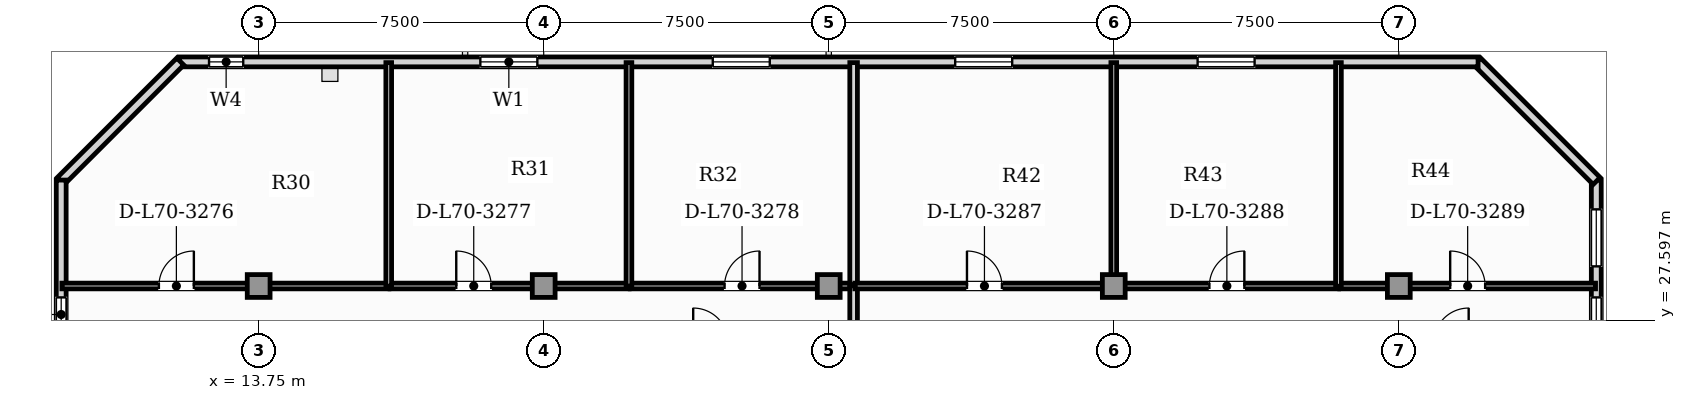
"""IFC4 building model, lengths in metres.
Left out: names, types, materials, properties, quantities, classifications, styles, units other than length and angle.
Written with IfcOpenShell. Run it as: python <this file> out.ifc"""

import sys

from ifc_helpers import new_model, si_unit, direction, frame, frame_2d, origin, origin_2d, place, context, subcontext, project, spatial, rectangle, extrude, element, fill, save


model = new_model("IFC4")
c1 = context("Model", 3, precision=1e-05, world=origin(), true_north=direction((0.0, 1.0)))
c2 = subcontext(c1, "Body", "Model", "MODEL_VIEW")
j1 = project(units=[si_unit("LENGTHUNIT", "METRE"), si_unit("PLANEANGLEUNIT", "RADIAN")], contexts=[c1])
p1 = place(None, origin())
s1 = spatial("IfcSite", under=j1, at=p1, CompositionType="ELEMENT")
p2 = place(p1, origin())
s2 = spatial("IfcBuilding", under=s1, at=p2, CompositionType="ELEMENT")
p3 = place(p2, frame((0.0, 0.0, 284.9)))
s3 = spatial("IfcBuildingStorey", under=s2, at=p3, CompositionType="ELEMENT", Elevation=284.9)
for number, where, z_axis, x_axis in (
    (1, (13.75, 28.5, 0.0), (0.0, 0.0, 1.0), (1.0, 0.0, 0.0)),
    (2, (21.25, 28.5, 0.0), (0.0, 0.0, 1.0), (1.0, 0.0, 0.0)),
    (3, (28.75, 28.5, 0.0), (0.0, 0.0, 1.0), (1.0, 0.0, 0.0)),
    (4, (36.25, 28.5, 0.0), (0.0, 0.0, 1.0), (1.0, 0.0, 0.0)),
    (5, (43.75, 28.5, 0.0), (0.0, 0.0, 1.0), (1.0, 0.0, 0.0)),
):
    element("IfcColumn", number, at=place(p3, frame(where, z_axis=z_axis, x_axis=x_axis)), inside=s3, PredefinedType="COLUMN", context=c2, shape_type="SweptSolid", body=[
        extrude(rectangle(XDim=0.6, YDim=0.6, at=origin_2d()), origin(), (0.0, 0.0, 1.0), 3.85),
    ])
p4 = place(p3, frame((48.946, 25.303, 0.0), z_axis=(0.0, 0.0, 1.0), x_axis=(0.0, 1.0, 0.0)))
e6 = element("IfcWall", 6, at=p4, inside=s3, PredefinedType="SOLIDWALL", context=c2, shape_type="SweptSolid", body=[
    extrude(rectangle(XDim=5.983, YDim=0.26, at=frame_2d((2.992, 0.0))), origin(), (0.0, 0.0, 1.0), 3.65),
])
p5 = place(p4, frame((1.997, 0.0, 0.95)))
e7 = element("IfcOpeningElement", 7, at=p5, cuts=e6, PredefinedType="OPENING", context=c2, shape_type="SweptSolid", body=[
    extrude(rectangle(XDim=0.9, YDim=1.5, at=frame_2d((0.45, 0.75))), frame((0.0, 0.14, 0.0), z_axis=(0.0, -1.0, 0.0), x_axis=(1.0, 0.0, 0.0)), (0.0, 0.0, 1.0), 0.28),
])
p6 = place(p4, frame((3.713, 0.0, 0.9)))
e8 = element("IfcOpeningElement", 8, at=p6, cuts=e6, PredefinedType="OPENING", context=c2, shape_type="SweptSolid", body=[
    extrude(rectangle(XDim=1.5, YDim=1.95, at=frame_2d((0.75, 0.975))), frame((0.0, 0.14, 0.0), z_axis=(0.0, -1.0, 0.0), x_axis=(1.0, 0.0, 0.0)), (0.0, 0.0, 1.0), 0.28),
])
p7 = place(p3, frame((48.956, 31.263, 0.0), z_axis=(0.0, 0.0, 1.0), x_axis=(-0.707079321262, 0.707134240044, 0.0)))
e9 = element("IfcWall", 9, at=p7, inside=s3, PredefinedType="SOLIDWALL", context=c2, shape_type="SweptSolid", body=[
    extrude(rectangle(XDim=4.446, YDim=0.26, at=frame_2d((2.223, 0.0))), origin(), (0.0, 0.0, 1.0), 3.65),
])
p8 = place(p3, frame((45.836, 34.397, 0.0), z_axis=(0.0, 0.0, 1.0), x_axis=(-1.0, 0.0, 0.0)))
e10 = element("IfcWall", 10, at=p8, inside=s3, PredefinedType="SOLIDWALL", context=c2, shape_type="SweptSolid", body=[
    extrude(rectangle(XDim=34.171, YDim=0.26, at=frame_2d((17.086, 0.0))), origin(), (0.0, 0.0, 1.0), 3.65),
])
p9 = place(p8, frame((32.492, 0.0, 0.95)))
e11 = element("IfcOpeningElement", 11, at=p9, cuts=e10, PredefinedType="OPENING", context=c2, shape_type="SweptSolid", body=[
    extrude(rectangle(XDim=0.9, YDim=1.5, at=frame_2d((0.45, 0.75))), frame((0.0, 0.14, 0.0), z_axis=(0.0, -1.0, 0.0), x_axis=(1.0, 0.0, 0.0)), (0.0, 0.0, 1.0), 0.28),
])
p10 = place(p8, frame((24.753, 0.0, 0.9)))
e12 = element("IfcOpeningElement", 12, at=p10, cuts=e10, PredefinedType="OPENING", context=c2, shape_type="SweptSolid", body=[
    extrude(rectangle(XDim=1.5, YDim=1.95, at=frame_2d((0.75, 0.975))), frame((0.0, 0.14, 0.0), z_axis=(0.0, -1.0, 0.0), x_axis=(1.0, 0.0, 0.0)), (0.0, 0.0, 1.0), 0.28),
])
p11 = place(p8, frame((18.637, 0.0, 0.9)))
e13 = element("IfcOpeningElement", 13, at=p11, cuts=e10, PredefinedType="OPENING", context=c2, shape_type="SweptSolid", body=[
    extrude(rectangle(XDim=1.5, YDim=1.95, at=frame_2d((0.75, 0.975))), frame((0.0, 0.14, 0.0), z_axis=(0.0, -1.0, 0.0), x_axis=(1.0, 0.0, 0.0)), (0.0, 0.0, 1.0), 0.28),
])
p12 = place(p8, frame((12.259, 0.0, 0.9)))
e14 = element("IfcOpeningElement", 14, at=p12, cuts=e10, PredefinedType="OPENING", context=c2, shape_type="SweptSolid", body=[
    extrude(rectangle(XDim=1.5, YDim=1.95, at=frame_2d((0.75, 0.975))), frame((0.0, 0.14, 0.0), z_axis=(0.0, -1.0, 0.0), x_axis=(1.0, 0.0, 0.0)), (0.0, 0.0, 1.0), 0.28),
])
p13 = place(p8, frame((5.88, 0.0, 0.9)))
e15 = element("IfcOpeningElement", 15, at=p13, cuts=e10, PredefinedType="OPENING", context=c2, shape_type="SweptSolid", body=[
    extrude(rectangle(XDim=1.5, YDim=1.95, at=frame_2d((0.75, 0.975))), frame((0.0, 0.14, 0.0), z_axis=(0.0, -1.0, 0.0), x_axis=(1.0, 0.0, 0.0)), (0.0, 0.0, 1.0), 0.28),
])
p14 = place(p3, frame((11.688, 34.407, 0.0), z_axis=(0.0, 0.0, 1.0), x_axis=(-0.707079321262, -0.707134240044, 0.0)))
e16 = element("IfcWall", 16, at=p14, inside=s3, PredefinedType="SOLIDWALL", context=c2, shape_type="SweptSolid", body=[
    extrude(rectangle(XDim=4.446, YDim=0.26, at=frame_2d((2.223, 0.0))), origin(), (0.0, 0.0, 1.0), 3.65),
])
p15 = place(p3, frame((8.554, 31.287, 0.0), z_axis=(0.0, 0.0, 1.0), x_axis=(0.0, -1.0, 0.0)))
e17 = element("IfcWall", 17, at=p15, inside=s3, PredefinedType="SOLIDWALL", context=c2, shape_type="SweptSolid", body=[
    extrude(rectangle(XDim=5.983, YDim=0.26, at=frame_2d((2.992, 0.0))), origin(), (0.0, 0.0, 1.0), 3.65),
])
p16 = place(p15, frame((3.087, 0.0, 0.95)))
e18 = element("IfcOpeningElement", 18, at=p16, cuts=e17, PredefinedType="OPENING", context=c2, shape_type="SweptSolid", body=[
    extrude(rectangle(XDim=0.9, YDim=1.5, at=frame_2d((0.45, 0.75))), frame((0.0, 0.14, 0.0), z_axis=(0.0, -1.0, 0.0), x_axis=(1.0, 0.0, 0.0)), (0.0, 0.0, 1.0), 0.28),
])
p17 = place(p3, frame((8.574, 28.5, 0.0), z_axis=(0.0, 0.0, 1.0), x_axis=(1.0, 0.0, 0.0)))
e19 = element("IfcWall", 19, at=p17, inside=s3, PredefinedType="PARTITIONING", context=c2, shape_type="SweptSolid", body=[
    extrude(rectangle(XDim=8.604, YDim=0.15, at=frame_2d((4.302, 0.0))), origin(), (0.0, 0.0, 1.0), 3.117),
])
p18 = place(p17, frame((2.551, 0.0, 0.0)))
e20 = element("IfcOpeningElement", 20, at=p18, cuts=e19, PredefinedType="OPENING", context=c2, shape_type="SweptSolid", body=[
    extrude(rectangle(XDim=0.92, YDim=2.1, at=frame_2d((0.46, 1.05))), frame((0.0, 0.085, 0.0), z_axis=(0.0, -1.0, 0.0), x_axis=(1.0, 0.0, 0.0)), (0.0, 0.0, 1.0), 0.17),
])
p19 = place(p3, frame((17.208, 28.5, 0.0), z_axis=(0.0, 0.0, 1.0), x_axis=(1.0, 0.0, 0.0)))
e21 = element("IfcWall", 21, at=p19, inside=s3, PredefinedType="PARTITIONING", context=c2, shape_type="SweptSolid", body=[
    extrude(rectangle(XDim=6.291, YDim=0.15, at=frame_2d((3.145, 0.0))), origin(), (0.0, 0.0, 1.0), 3.117),
])
p20 = place(p19, frame((1.742, 0.0, 0.0)))
e22 = element("IfcOpeningElement", 22, at=p20, cuts=e21, PredefinedType="OPENING", context=c2, shape_type="SweptSolid", body=[
    extrude(rectangle(XDim=0.92, YDim=2.1, at=frame_2d((0.46, 1.05))), frame((0.0, 0.085, 0.0), z_axis=(0.0, -1.0, 0.0), x_axis=(1.0, 0.0, 0.0)), (0.0, 0.0, 1.0), 0.17),
])
p21 = place(p3, frame((23.528, 28.5, 0.0), z_axis=(0.0, 0.0, 1.0), x_axis=(1.0, 0.0, 0.0)))
e23 = element("IfcWall", 23, at=p21, inside=s3, PredefinedType="PARTITIONING", context=c2, shape_type="SweptSolid", body=[
    extrude(rectangle(XDim=5.881, YDim=0.15, at=frame_2d((2.941, 0.0))), origin(), (0.0, 0.0, 1.0), 3.117),
])
p22 = place(p21, frame((2.481, 0.0, 0.0)))
e24 = element("IfcOpeningElement", 24, at=p22, cuts=e23, PredefinedType="OPENING", context=c2, shape_type="SweptSolid", body=[
    extrude(rectangle(XDim=0.92, YDim=2.1, at=frame_2d((0.46, 1.05))), frame((0.0, 0.085, 0.0), z_axis=(0.0, -1.0, 0.0), x_axis=(1.0, 0.0, 0.0)), (0.0, 0.0, 1.0), 0.17),
])
p23 = place(p3, frame((29.405, 26.995, 0.0), z_axis=(0.0, 0.0, 1.0), x_axis=(0.0, 1.0, 0.0)))
e25 = element("IfcWall", 25, at=p23, inside=s3, PredefinedType="PARTITIONING", context=c2, shape_type="SweptSolid", body=[
    extrude(rectangle(XDim=1.51, YDim=0.2, at=frame_2d((0.755, 0.0))), origin(), (0.0, 0.0, 1.0), 3.65),
])
for number, where, z_axis, x_axis in (
    (26, (17.172, 28.495, 0.0), (0.0, 0.0, 1.0), (0.0, 1.0, 0.0)),
    (27, (23.493, 28.495, 0.0), (0.0, 0.0, 1.0), (0.0, 1.0, 0.0)),
):
    element("IfcWall", number, at=place(p3, frame(where, z_axis=z_axis, x_axis=x_axis)), inside=s3, PredefinedType="PARTITIONING", context=c2, shape_type="SweptSolid", body=[
        extrude(rectangle(XDim=5.882, YDim=0.15, at=frame_2d((2.941, 0.0))), origin(), (0.0, 0.0, 1.0), 3.65),
    ])
p24 = place(p3, frame((29.405, 28.535, 0.0), z_axis=(0.0, 0.0, 1.0), x_axis=(0.0, 1.0, 0.0)))
e28 = element("IfcWall", 28, at=p24, inside=s3, PredefinedType="PARTITIONING", context=c2, shape_type="SweptSolid", body=[
    extrude(rectangle(XDim=5.843, YDim=0.2, at=frame_2d((2.921, 0.0))), origin(), (0.0, 0.0, 1.0), 3.65),
])
p25 = place(p3, frame((29.439, 28.5, 0.0), z_axis=(0.0, 0.0, 1.0), x_axis=(1.0, 0.0, 0.0)))
e29 = element("IfcWall", 29, at=p25, inside=s3, PredefinedType="PARTITIONING", context=c2, shape_type="SweptSolid", body=[
    extrude(rectangle(XDim=6.815, YDim=0.15, at=frame_2d((3.408, 0.0))), origin(), (0.0, 0.0, 1.0), 3.117),
])
p26 = place(p25, frame((2.948, 0.0, 0.0)))
e30 = element("IfcOpeningElement", 30, at=p26, cuts=e29, PredefinedType="OPENING", context=c2, shape_type="SweptSolid", body=[
    extrude(rectangle(XDim=0.92, YDim=2.1, at=frame_2d((0.46, 1.05))), frame((0.0, 0.085, 0.0), z_axis=(0.0, -1.0, 0.0), x_axis=(1.0, 0.0, 0.0)), (0.0, 0.0, 1.0), 0.17),
])
p27 = place(p3, frame((36.285, 28.5, 0.0), z_axis=(0.0, 0.0, 1.0), x_axis=(1.0, 0.0, 0.0)))
e31 = element("IfcWall", 31, at=p27, inside=s3, PredefinedType="PARTITIONING", context=c2, shape_type="SweptSolid", body=[
    extrude(rectangle(XDim=5.882, YDim=0.15, at=frame_2d((2.941, 0.0))), origin(), (0.0, 0.0, 1.0), 3.117),
])
p28 = place(p27, frame((2.481, 0.0, 0.0)))
e32 = element("IfcOpeningElement", 32, at=p28, cuts=e31, PredefinedType="OPENING", context=c2, shape_type="SweptSolid", body=[
    extrude(rectangle(XDim=0.92, YDim=2.1, at=frame_2d((0.46, 1.05))), frame((0.0, 0.085, 0.0), z_axis=(0.0, -1.0, 0.0), x_axis=(1.0, 0.0, 0.0)), (0.0, 0.0, 1.0), 0.17),
])
p29 = place(p3, frame((42.197, 28.5, 0.0), z_axis=(0.0, 0.0, 1.0), x_axis=(1.0, 0.0, 0.0)))
e33 = element("IfcWall", 33, at=p29, inside=s3, PredefinedType="PARTITIONING", context=c2, shape_type="SweptSolid", body=[
    extrude(rectangle(XDim=6.729, YDim=0.15, at=frame_2d((3.365, 0.0))), origin(), (0.0, 0.0, 1.0), 3.117),
])
p30 = place(p29, frame((2.905, 0.0, 0.0)))
e34 = element("IfcOpeningElement", 34, at=p30, cuts=e33, PredefinedType="OPENING", context=c2, shape_type="SweptSolid", body=[
    extrude(rectangle(XDim=0.92, YDim=2.1, at=frame_2d((0.46, 1.05))), frame((0.0, 0.085, 0.0), z_axis=(0.0, -1.0, 0.0), x_axis=(1.0, 0.0, 0.0)), (0.0, 0.0, 1.0), 0.17),
])
for number, where, z_axis, x_axis in (
    (35, (36.25, 28.495, 0.0), (0.0, 0.0, 1.0), (0.0, 1.0, 0.0)),
    (36, (42.162, 28.495, 0.0), (0.0, 0.0, 1.0), (0.0, 1.0, 0.0)),
):
    element("IfcWall", number, at=place(p3, frame(where, z_axis=z_axis, x_axis=x_axis)), inside=s3, PredefinedType="PARTITIONING", context=c2, shape_type="SweptSolid", body=[
        extrude(rectangle(XDim=5.882, YDim=0.15, at=frame_2d((2.941, 0.0))), origin(), (0.0, 0.0, 1.0), 3.65),
    ])
p31 = place(p16, origin())
e37 = element("IfcWindow", 37, at=p31, inside=s3, PartitioningType="SINGLE_PANEL", PredefinedType="WINDOW", context=c2, shape_type="SweptSolid", body=[
    extrude(rectangle(XDim=0.9, YDim=1.5, at=frame_2d((0.45, 0.75))), frame((0.0, 0.03, 0.0), z_axis=(0.0, -1.0, 0.0), x_axis=(1.0, 0.0, 0.0)), (0.0, 0.0, 1.0), 0.06),
])
fill(e18, e37)
p32 = place(p9, origin())
e38 = element("IfcWindow", 38, at=p32, inside=s3, PartitioningType="SINGLE_PANEL", PredefinedType="WINDOW", context=c2, shape_type="SweptSolid", body=[
    extrude(rectangle(XDim=0.9, YDim=1.5, at=frame_2d((0.45, 0.75))), frame((0.0, 0.03, 0.0), z_axis=(0.0, -1.0, 0.0), x_axis=(1.0, 0.0, 0.0)), (0.0, 0.0, 1.0), 0.06),
])
fill(e11, e38)
p33 = place(p10, origin())
e39 = element("IfcWindow", 39, at=p33, inside=s3, PartitioningType="SINGLE_PANEL", PredefinedType="WINDOW", context=c2, shape_type="SweptSolid", body=[
    extrude(rectangle(XDim=1.5, YDim=1.95, at=frame_2d((0.75, 0.975))), frame((0.0, 0.03, 0.0), z_axis=(0.0, -1.0, 0.0), x_axis=(1.0, 0.0, 0.0)), (0.0, 0.0, 1.0), 0.06),
])
fill(e12, e39)
p34 = place(p11, origin())
e40 = element("IfcWindow", 40, at=p34, inside=s3, PartitioningType="SINGLE_PANEL", PredefinedType="WINDOW", context=c2, shape_type="SweptSolid", body=[
    extrude(rectangle(XDim=1.5, YDim=1.95, at=frame_2d((0.75, 0.975))), frame((0.0, 0.03, 0.0), z_axis=(0.0, -1.0, 0.0), x_axis=(1.0, 0.0, 0.0)), (0.0, 0.0, 1.0), 0.06),
])
fill(e13, e40)
p35 = place(p5, origin())
e41 = element("IfcWindow", 41, at=p35, inside=s3, PartitioningType="SINGLE_PANEL", PredefinedType="WINDOW", context=c2, shape_type="SweptSolid", body=[
    extrude(rectangle(XDim=0.9, YDim=1.5, at=frame_2d((0.45, 0.75))), frame((0.0, 0.03, 0.0), z_axis=(0.0, -1.0, 0.0), x_axis=(1.0, 0.0, 0.0)), (0.0, 0.0, 1.0), 0.06),
])
fill(e7, e41)
p36 = place(p12, origin())
e42 = element("IfcWindow", 42, at=p36, inside=s3, PartitioningType="SINGLE_PANEL", PredefinedType="WINDOW", context=c2, shape_type="SweptSolid", body=[
    extrude(rectangle(XDim=1.5, YDim=1.95, at=frame_2d((0.75, 0.975))), frame((0.0, 0.03, 0.0), z_axis=(0.0, -1.0, 0.0), x_axis=(1.0, 0.0, 0.0)), (0.0, 0.0, 1.0), 0.06),
])
fill(e14, e42)
p37 = place(p13, origin())
e43 = element("IfcWindow", 43, at=p37, inside=s3, PartitioningType="SINGLE_PANEL", PredefinedType="WINDOW", context=c2, shape_type="SweptSolid", body=[
    extrude(rectangle(XDim=1.5, YDim=1.95, at=frame_2d((0.75, 0.975))), frame((0.0, 0.03, 0.0), z_axis=(0.0, -1.0, 0.0), x_axis=(1.0, 0.0, 0.0)), (0.0, 0.0, 1.0), 0.06),
])
fill(e15, e43)
p38 = place(p6, origin())
e44 = element("IfcWindow", 44, at=p38, inside=s3, PartitioningType="SINGLE_PANEL", PredefinedType="WINDOW", context=c2, shape_type="SweptSolid", body=[
    extrude(rectangle(XDim=1.5, YDim=1.95, at=frame_2d((0.75, 0.975))), frame((0.0, 0.03, 0.0), z_axis=(0.0, -1.0, 0.0), x_axis=(1.0, 0.0, 0.0)), (0.0, 0.0, 1.0), 0.06),
])
fill(e8, e44)
p39 = place(p18, origin())
e45 = element("IfcDoor", 45, at=p39, inside=s3, OperationType="SINGLE_SWING_RIGHT", PredefinedType="DOOR", context=c2, shape_type="SweptSolid", body=[
    extrude(rectangle(XDim=0.92, YDim=2.1, at=frame_2d((0.46, 1.05))), frame((0.0, 0.025, 0.0), z_axis=(0.0, -1.0, 0.0), x_axis=(1.0, 0.0, 0.0)), (0.0, 0.0, 1.0), 0.05),
])
fill(e20, e45)
p40 = place(p20, origin())
e46 = element("IfcDoor", 46, at=p40, inside=s3, OperationType="SINGLE_SWING_LEFT", PredefinedType="DOOR", context=c2, shape_type="SweptSolid", body=[
    extrude(rectangle(XDim=0.92, YDim=2.1, at=frame_2d((0.46, 1.05))), frame((0.0, 0.025, 0.0), z_axis=(0.0, -1.0, 0.0), x_axis=(1.0, 0.0, 0.0)), (0.0, 0.0, 1.0), 0.05),
])
fill(e22, e46)
p41 = place(p22, origin())
e47 = element("IfcDoor", 47, at=p41, inside=s3, OperationType="SINGLE_SWING_RIGHT", PredefinedType="DOOR", context=c2, shape_type="SweptSolid", body=[
    extrude(rectangle(XDim=0.92, YDim=2.1, at=frame_2d((0.46, 1.05))), frame((0.0, 0.025, 0.0), z_axis=(0.0, -1.0, 0.0), x_axis=(1.0, 0.0, 0.0)), (0.0, 0.0, 1.0), 0.05),
])
fill(e24, e47)
p42 = place(p26, origin())
e48 = element("IfcDoor", 48, at=p42, inside=s3, OperationType="SINGLE_SWING_LEFT", PredefinedType="DOOR", context=c2, shape_type="SweptSolid", body=[
    extrude(rectangle(XDim=0.92, YDim=2.1, at=frame_2d((0.46, 1.05))), frame((0.0, 0.025, 0.0), z_axis=(0.0, -1.0, 0.0), x_axis=(1.0, 0.0, 0.0)), (0.0, 0.0, 1.0), 0.05),
])
fill(e30, e48)
p43 = place(p28, origin())
e49 = element("IfcDoor", 49, at=p43, inside=s3, OperationType="SINGLE_SWING_RIGHT", PredefinedType="DOOR", context=c2, shape_type="SweptSolid", body=[
    extrude(rectangle(XDim=0.92, YDim=2.1, at=frame_2d((0.46, 1.05))), frame((0.0, 0.025, 0.0), z_axis=(0.0, -1.0, 0.0), x_axis=(1.0, 0.0, 0.0)), (0.0, 0.0, 1.0), 0.05),
])
fill(e32, e49)
p44 = place(p30, origin())
e50 = element("IfcDoor", 50, at=p44, inside=s3, OperationType="SINGLE_SWING_LEFT", PredefinedType="DOOR", context=c2, shape_type="SweptSolid", body=[
    extrude(rectangle(XDim=0.92, YDim=2.1, at=frame_2d((0.46, 1.05))), frame((0.0, 0.025, 0.0), z_axis=(0.0, -1.0, 0.0), x_axis=(1.0, 0.0, 0.0)), (0.0, 0.0, 1.0), 0.05),
])
fill(e34, e50)
save(model, sys.argv[1])
